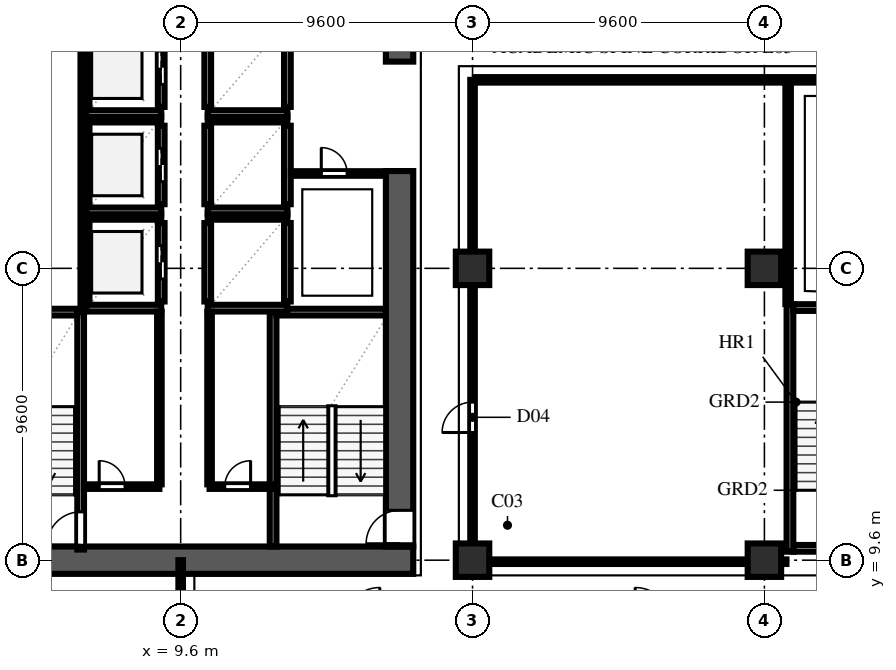
"""IFC4 building model, lengths in metres.
Left out: names, types, materials, properties, quantities, classifications, styles, units other than length and angle.
Written with IfcOpenShell. Run it as: python <this file> out.ifc"""

import sys

from ifc_helpers import new_model, si_unit, direction, frame, frame_2d, origin, origin_2d, place, context, subcontext, project, spatial, rectangle, extrude, element, fill, save


model = new_model("IFC4")
c1 = context("Model", 3, precision=1e-05, world=origin(), true_north=direction((0.0, 1.0)))
c2 = subcontext(c1, "Body", "Model", "MODEL_VIEW")
j1 = project(units=[si_unit("LENGTHUNIT", "METRE"), si_unit("PLANEANGLEUNIT", "RADIAN")], contexts=[c1])
p1 = place(None, origin())
s1 = spatial("IfcSite", under=j1, at=p1, CompositionType="ELEMENT")
p2 = place(p1, origin())
s2 = spatial("IfcBuilding", under=s1, at=p2, CompositionType="ELEMENT")
p3 = place(p2, frame((0.0, 0.0, 24.2)))
s3 = spatial("IfcBuildingStorey", under=s2, at=p3, CompositionType="ELEMENT", Elevation=24.2)
p4 = place(p3, frame((2.65, 9.6, 0.0), z_axis=(0.0, 0.0, 1.0), x_axis=(1.0, 0.0, 0.0)))
e1 = element("IfcWall", 1, at=p4, inside=s3, PredefinedType="SHEAR", context=c2, shape_type="SweptSolid", body=[
    extrude(rectangle(XDim=14.6, YDim=0.9, at=frame_2d((7.3, 0.0))), origin(), (0.0, 0.0, 1.0), 3.54),
])
p5 = place(p3, frame((16.8, 10.05, 0.0), z_axis=(0.0, 0.0, 1.0), x_axis=(0.0, 1.0, 0.0)))
e2 = element("IfcWall", 2, at=p5, inside=s3, PredefinedType="SHEAR", context=c2, shape_type="SweptSolid", body=[
    extrude(rectangle(XDim=12.35, YDim=0.9, at=frame_2d((6.175, 0.0))), origin(), (0.0, 0.0, 1.0), 3.54),
])
p6 = place(p5, frame((0.09, 0.0, 0.0)))
e3 = element("IfcOpeningElement", 3, at=p6, cuts=e2, PredefinedType="OPENING", context=c2, shape_type="SweptSolid", body=[
    extrude(rectangle(XDim=1.1, YDim=2.2, at=frame_2d((0.55, 1.1))), frame((0.0, 0.462, 0.0), z_axis=(0.0, -1.0, 0.0), x_axis=(1.0, 0.0, 0.0)), (0.0, 0.0, 1.0), 0.924),
])
p7 = place(p3, frame((16.8, 26.0, 0.0), z_axis=(0.0, 0.0, 1.0), x_axis=(0.0, 1.0, 0.0)))
e4 = element("IfcWall", 4, at=p7, inside=s3, PredefinedType="SHEAR", context=c2, shape_type="SweptSolid", body=[
    extrude(rectangle(XDim=7.8, YDim=0.9, at=frame_2d((3.9, 0.0))), origin(), (0.0, 0.0, 1.0), 3.54),
])
for number, where, z_axis, x_axis in (
    (5, (19.2, 9.6, 0.0), (0.0, 0.0, 1.0), (1.0, 0.0, 0.0)),
    (6, (19.2, 19.2, 0.0), (0.0, 0.0, 1.0), (1.0, 0.0, 0.0)),
    (7, (28.8, 9.6, 0.0), (0.0, 0.0, 1.0), (1.0, 0.0, 0.0)),
    (8, (28.8, 19.2, 0.0), (0.0, 0.0, 1.0), (1.0, 0.0, 0.0)),
):
    element("IfcColumn", number, at=place(p3, frame(where, z_axis=z_axis, x_axis=x_axis)), inside=s3, PredefinedType="COLUMN", context=c2, shape_type="SweptSolid", body=[
        extrude(rectangle(XDim=1.1, YDim=1.1, at=origin_2d()), origin(), (0.0, 0.0, 1.0), 3.8),
    ])
p8 = place(p3, frame((6.31, 9.95, 0.0), z_axis=(0.0, 0.0, 1.0), x_axis=(0.0, 1.0, 0.0)))
e9 = element("IfcWall", 9, at=p8, inside=s3, PredefinedType="SOLIDWALL", context=c2, shape_type="SweptSolid", body=[
    extrude(rectangle(XDim=7.81, YDim=0.22, at=frame_2d((3.905, 0.0))), origin(), (0.0, 0.0, 1.0), 3.54),
])
p9 = place(p8, frame((0.14, 0.0, 0.0)))
e10 = element("IfcOpeningElement", 10, at=p9, cuts=e9, PredefinedType="OPENING", context=c2, shape_type="SweptSolid", body=[
    extrude(rectangle(XDim=1.1, YDim=2.2, at=frame_2d((0.55, 1.1))), frame((0.0, 0.122, 0.0), z_axis=(0.0, -1.0, 0.0), x_axis=(1.0, 0.0, 0.0)), (0.0, 0.0, 1.0), 0.244),
])
p10 = place(p3, frame((2.65, 17.76, 0.0), z_axis=(0.0, 0.0, 1.0), x_axis=(1.0, 0.0, 0.0)))
e11 = element("IfcWall", 11, at=p10, inside=s3, PredefinedType="SOLIDWALL", context=c2, shape_type="SweptSolid", body=[
    extrude(rectangle(XDim=3.55, YDim=0.22, at=frame_2d((1.775, 0.0))), origin(), (0.0, 0.0, 1.0), 3.54),
])
p11 = place(p3, frame((12.64, 10.05, 0.0), z_axis=(0.0, 0.0, 1.0), x_axis=(0.0, 1.0, 0.0)))
e12 = element("IfcWall", 12, at=p11, inside=s3, PredefinedType="SOLIDWALL", context=c2, shape_type="SweptSolid", body=[
    extrude(rectangle(XDim=7.71, YDim=0.22, at=frame_2d((3.855, 0.0))), origin(), (0.0, 0.0, 1.0), 3.54),
])
p12 = place(p3, frame((12.75, 17.76, 0.0), z_axis=(0.0, 0.0, 1.0), x_axis=(1.0, 0.0, 0.0)))
e13 = element("IfcWall", 13, at=p12, inside=s3, PredefinedType="SOLIDWALL", context=c2, shape_type="SweptSolid", body=[
    extrude(rectangle(XDim=3.6, YDim=0.22, at=frame_2d((1.8, 0.0))), origin(), (0.0, 0.0, 1.0), 3.54),
])
p13 = place(p3, frame((29.75, 9.99, 0.0), z_axis=(0.0, 0.0, 1.0), x_axis=(1.0, 0.0, 0.0)))
e14 = element("IfcWall", 14, at=p13, inside=s3, PredefinedType="SOLIDWALL", context=c2, shape_type="SweptSolid", body=[
    extrude(rectangle(XDim=3.65, YDim=0.22, at=frame_2d((1.825, 0.0))), origin(), (0.0, 0.0, 1.0), 3.54),
])
p14 = place(p13, frame((1.24, 0.0, 0.0)))
e15 = element("IfcOpeningElement", 15, at=p14, cuts=e14, PredefinedType="OPENING", context=c2, shape_type="SweptSolid", body=[
    extrude(rectangle(XDim=1.1, YDim=2.2, at=frame_2d((0.55, 1.1))), frame((0.0, 0.122, 0.0), z_axis=(0.0, -1.0, 0.0), x_axis=(1.0, 0.0, 0.0)), (0.0, 0.0, 1.0), 0.244),
])
p15 = place(p3, frame((29.64, 9.88, 0.0), z_axis=(0.0, 0.0, 1.0), x_axis=(0.0, 1.0, 0.0)))
e16 = element("IfcWall", 16, at=p15, inside=s3, PredefinedType="SOLIDWALL", context=c2, shape_type="SweptSolid", body=[
    extrude(rectangle(XDim=8.14, YDim=0.22, at=frame_2d((4.07, 0.0))), origin(), (0.0, 0.0, 1.0), 3.54),
])
p16 = place(p3, frame((29.75, 17.91, 0.0), z_axis=(0.0, 0.0, 1.0), x_axis=(1.0, 0.0, 0.0)))
e17 = element("IfcWall", 17, at=p16, inside=s3, PredefinedType="SOLIDWALL", context=c2, shape_type="SweptSolid", body=[
    extrude(rectangle(XDim=3.65, YDim=0.22, at=frame_2d((1.825, 0.0))), origin(), (0.0, 0.0, 1.0), 3.54),
])
p17 = place(p3, frame((6.49, 18.11, 0.0), z_axis=(0.0, 0.0, 1.0), x_axis=(0.0, 1.0, 0.0)))
e18 = element("IfcWall", 18, at=p17, inside=s3, PredefinedType="SOLIDWALL", context=c2, shape_type="SweptSolid", body=[
    extrude(rectangle(XDim=2.58, YDim=0.22, at=frame_2d((1.29, 0.0))), origin(), (0.0, 0.0, 1.0), 3.54),
])
p18 = place(p3, frame((8.96, 18.11, 0.0), z_axis=(0.0, 0.0, 1.0), x_axis=(0.0, 1.0, 0.0)))
e19 = element("IfcWall", 19, at=p18, inside=s3, PredefinedType="SOLIDWALL", context=c2, shape_type="SweptSolid", body=[
    extrude(rectangle(XDim=2.58, YDim=0.22, at=frame_2d((1.29, 0.0))), origin(), (0.0, 0.0, 1.0), 3.54),
])
p19 = place(p18, frame((0.74, 0.0, 0.0)))
e20 = element("IfcOpeningElement", 20, at=p19, cuts=e19, PredefinedType="OPENING", context=c2, shape_type="SweptSolid", body=[
    extrude(rectangle(XDim=1.1, YDim=2.2, at=frame_2d((0.55, 1.1))), frame((0.0, 0.122, 0.0), z_axis=(0.0, -1.0, 0.0), x_axis=(1.0, 0.0, 0.0)), (0.0, 0.0, 1.0), 0.244),
])
for number, where, z_axis, x_axis in (
    (21, (6.49, 17.89, 0.0), (0.0, 0.0, 1.0), (1.0, 0.0, 0.0)),
    (22, (6.49, 20.91, 0.0), (0.0, 0.0, 1.0), (1.0, 0.0, 0.0)),
):
    element("IfcWall", number, at=place(p3, frame(where, z_axis=z_axis, x_axis=x_axis)), inside=s3, PredefinedType="SOLIDWALL", context=c2, shape_type="SweptSolid", body=[
        extrude(rectangle(XDim=2.47, YDim=0.22, at=frame_2d((1.235, 0.0))), origin(), (0.0, 0.0, 1.0), 3.54),
    ])
p20 = place(p3, frame((6.49, 21.31, 0.0), z_axis=(0.0, 0.0, 1.0), x_axis=(0.0, 1.0, 0.0)))
e23 = element("IfcWall", 23, at=p20, inside=s3, PredefinedType="SOLIDWALL", context=c2, shape_type="SweptSolid", body=[
    extrude(rectangle(XDim=2.58, YDim=0.22, at=frame_2d((1.29, 0.0))), origin(), (0.0, 0.0, 1.0), 3.54),
])
p21 = place(p3, frame((8.96, 21.31, 0.0), z_axis=(0.0, 0.0, 1.0), x_axis=(0.0, 1.0, 0.0)))
e24 = element("IfcWall", 24, at=p21, inside=s3, PredefinedType="SOLIDWALL", context=c2, shape_type="SweptSolid", body=[
    extrude(rectangle(XDim=2.58, YDim=0.22, at=frame_2d((1.29, 0.0))), origin(), (0.0, 0.0, 1.0), 3.54),
])
p22 = place(p21, frame((0.74, 0.0, 0.0)))
e25 = element("IfcOpeningElement", 25, at=p22, cuts=e24, PredefinedType="OPENING", context=c2, shape_type="SweptSolid", body=[
    extrude(rectangle(XDim=1.1, YDim=2.2, at=frame_2d((0.55, 1.1))), frame((0.0, 0.122, 0.0), z_axis=(0.0, -1.0, 0.0), x_axis=(1.0, 0.0, 0.0)), (0.0, 0.0, 1.0), 0.244),
])
for number, where, z_axis, x_axis in (
    (26, (6.49, 21.09, 0.0), (0.0, 0.0, 1.0), (1.0, 0.0, 0.0)),
    (27, (6.49, 24.11, 0.0), (0.0, 0.0, 1.0), (1.0, 0.0, 0.0)),
):
    element("IfcWall", number, at=place(p3, frame(where, z_axis=z_axis, x_axis=x_axis)), inside=s3, PredefinedType="SOLIDWALL", context=c2, shape_type="SweptSolid", body=[
        extrude(rectangle(XDim=2.47, YDim=0.22, at=frame_2d((1.235, 0.0))), origin(), (0.0, 0.0, 1.0), 3.54),
    ])
p23 = place(p3, frame((6.49, 24.51, 0.0), z_axis=(0.0, 0.0, 1.0), x_axis=(0.0, 1.0, 0.0)))
e28 = element("IfcWall", 28, at=p23, inside=s3, PredefinedType="SOLIDWALL", context=c2, shape_type="SweptSolid", body=[
    extrude(rectangle(XDim=2.58, YDim=0.22, at=frame_2d((1.29, 0.0))), origin(), (0.0, 0.0, 1.0), 3.54),
])
p24 = place(p3, frame((8.96, 24.51, 0.0), z_axis=(0.0, 0.0, 1.0), x_axis=(0.0, 1.0, 0.0)))
e29 = element("IfcWall", 29, at=p24, inside=s3, PredefinedType="SOLIDWALL", context=c2, shape_type="SweptSolid", body=[
    extrude(rectangle(XDim=2.58, YDim=0.22, at=frame_2d((1.29, 0.0))), origin(), (0.0, 0.0, 1.0), 3.54),
])
p25 = place(p24, frame((0.74, 0.0, 0.0)))
e30 = element("IfcOpeningElement", 30, at=p25, cuts=e29, PredefinedType="OPENING", context=c2, shape_type="SweptSolid", body=[
    extrude(rectangle(XDim=1.1, YDim=2.2, at=frame_2d((0.55, 1.1))), frame((0.0, 0.122, 0.0), z_axis=(0.0, -1.0, 0.0), x_axis=(1.0, 0.0, 0.0)), (0.0, 0.0, 1.0), 0.244),
])
p26 = place(p3, frame((6.49, 24.29, 0.0), z_axis=(0.0, 0.0, 1.0), x_axis=(1.0, 0.0, 0.0)))
e31 = element("IfcWall", 31, at=p26, inside=s3, PredefinedType="SOLIDWALL", context=c2, shape_type="SweptSolid", body=[
    extrude(rectangle(XDim=2.47, YDim=0.22, at=frame_2d((1.235, 0.0))), origin(), (0.0, 0.0, 1.0), 3.54),
])
for number, where, z_axis, x_axis in (
    (32, (10.49, 18.11, 0.0), (0.0, 0.0, 1.0), (0.0, 1.0, 0.0)),
    (33, (13.11, 18.11, 0.0), (0.0, 0.0, 1.0), (0.0, 1.0, 0.0)),
):
    element("IfcWall", number, at=place(p3, frame(where, z_axis=z_axis, x_axis=x_axis)), inside=s3, PredefinedType="SOLIDWALL", context=c2, shape_type="SweptSolid", body=[
        extrude(rectangle(XDim=2.58, YDim=0.22, at=frame_2d((1.29, 0.0))), origin(), (0.0, 0.0, 1.0), 3.54),
    ])
for number, where, z_axis, x_axis in (
    (34, (10.49, 17.89, 0.0), (0.0, 0.0, 1.0), (1.0, 0.0, 0.0)),
    (35, (10.49, 20.91, 0.0), (0.0, 0.0, 1.0), (1.0, 0.0, 0.0)),
):
    element("IfcWall", number, at=place(p3, frame(where, z_axis=z_axis, x_axis=x_axis)), inside=s3, PredefinedType="SOLIDWALL", context=c2, shape_type="SweptSolid", body=[
        extrude(rectangle(XDim=2.62, YDim=0.22, at=frame_2d((1.31, 0.0))), origin(), (0.0, 0.0, 1.0), 3.54),
    ])
for number, where, z_axis, x_axis in (
    (36, (10.49, 21.31, 0.0), (0.0, 0.0, 1.0), (0.0, 1.0, 0.0)),
    (37, (13.11, 21.31, 0.0), (0.0, 0.0, 1.0), (0.0, 1.0, 0.0)),
):
    element("IfcWall", number, at=place(p3, frame(where, z_axis=z_axis, x_axis=x_axis)), inside=s3, PredefinedType="SOLIDWALL", context=c2, shape_type="SweptSolid", body=[
        extrude(rectangle(XDim=2.58, YDim=0.22, at=frame_2d((1.29, 0.0))), origin(), (0.0, 0.0, 1.0), 3.54),
    ])
for number, where, z_axis, x_axis in (
    (38, (10.49, 21.09, 0.0), (0.0, 0.0, 1.0), (1.0, 0.0, 0.0)),
    (39, (10.49, 24.11, 0.0), (0.0, 0.0, 1.0), (1.0, 0.0, 0.0)),
):
    element("IfcWall", number, at=place(p3, frame(where, z_axis=z_axis, x_axis=x_axis)), inside=s3, PredefinedType="SOLIDWALL", context=c2, shape_type="SweptSolid", body=[
        extrude(rectangle(XDim=2.62, YDim=0.22, at=frame_2d((1.31, 0.0))), origin(), (0.0, 0.0, 1.0), 3.54),
    ])
for number, where, z_axis, x_axis in (
    (40, (10.49, 24.51, 0.0), (0.0, 0.0, 1.0), (0.0, 1.0, 0.0)),
    (41, (13.11, 24.51, 0.0), (0.0, 0.0, 1.0), (0.0, 1.0, 0.0)),
):
    element("IfcWall", number, at=place(p3, frame(where, z_axis=z_axis, x_axis=x_axis)), inside=s3, PredefinedType="SOLIDWALL", context=c2, shape_type="SweptSolid", body=[
        extrude(rectangle(XDim=2.58, YDim=0.22, at=frame_2d((1.29, 0.0))), origin(), (0.0, 0.0, 1.0), 3.54),
    ])
p27 = place(p3, frame((10.49, 24.29, 0.0), z_axis=(0.0, 0.0, 1.0), x_axis=(1.0, 0.0, 0.0)))
e42 = element("IfcWall", 42, at=p27, inside=s3, PredefinedType="SOLIDWALL", context=c2, shape_type="SweptSolid", body=[
    extrude(rectangle(XDim=2.62, YDim=0.22, at=frame_2d((1.31, 0.0))), origin(), (0.0, 0.0, 1.0), 3.54),
])
p28 = place(p3, frame((6.42, 12.02, 0.0), z_axis=(0.0, 0.0, 1.0), x_axis=(1.0, 0.0, 0.0)))
e43 = element("IfcWall", 43, at=p28, inside=s3, PredefinedType="PARTITIONING", context=c2, shape_type="SweptSolid", body=[
    extrude(rectangle(XDim=2.48, YDim=0.15, at=frame_2d((1.24, 0.0))), origin(), (0.0, 0.0, 1.0), 3.54),
])
p29 = place(p28, frame((0.5, 0.0, 0.0)))
e44 = element("IfcOpeningElement", 44, at=p29, cuts=e43, PredefinedType="OPENING", context=c2, shape_type="SweptSolid", body=[
    extrude(rectangle(XDim=0.85, YDim=2.1, at=frame_2d((0.425, 1.05))), frame((0.0, 0.087, 0.0), z_axis=(0.0, -1.0, 0.0), x_axis=(1.0, 0.0, 0.0)), (0.0, 0.0, 1.0), 0.174),
])
p30 = place(p3, frame((10.55, 12.02, 0.0), z_axis=(0.0, 0.0, 1.0), x_axis=(1.0, 0.0, 0.0)))
e45 = element("IfcWall", 45, at=p30, inside=s3, PredefinedType="PARTITIONING", context=c2, shape_type="SweptSolid", body=[
    extrude(rectangle(XDim=2.08, YDim=0.15, at=frame_2d((1.04, 0.0))), origin(), (0.0, 0.0, 1.0), 3.54),
])
p31 = place(p30, frame((0.5, 0.0, 0.0)))
e46 = element("IfcOpeningElement", 46, at=p31, cuts=e45, PredefinedType="OPENING", context=c2, shape_type="SweptSolid", body=[
    extrude(rectangle(XDim=0.85, YDim=2.1, at=frame_2d((0.425, 1.05))), frame((0.0, 0.087, 0.0), z_axis=(0.0, -1.0, 0.0), x_axis=(1.0, 0.0, 0.0)), (0.0, 0.0, 1.0), 0.174),
])
for number, where, z_axis, x_axis in (
    (47, (8.9, 12.095, 0.0), (0.0, 0.0, 1.0), (0.0, 1.0, 0.0)),
    (48, (10.55, 12.095, 0.0), (0.0, 0.0, 1.0), (0.0, 1.0, 0.0)),
):
    element("IfcWall", number, at=place(p3, frame(where, z_axis=z_axis, x_axis=x_axis)), inside=s3, PredefinedType="PARTITIONING", context=c2, shape_type="SweptSolid", body=[
        extrude(rectangle(XDim=5.68, YDim=0.15, at=frame_2d((2.84, 0.0))), origin(), (0.0, 0.0, 1.0), 3.54),
    ])
p32 = place(p3, frame((13.225, 22.32, 0.0), z_axis=(0.0, 0.0, 1.0), x_axis=(1.0, 0.0, 0.0)))
e49 = element("IfcWall", 49, at=p32, inside=s3, PredefinedType="PARTITIONING", context=c2, shape_type="SweptSolid", body=[
    extrude(rectangle(XDim=3.12, YDim=0.15, at=frame_2d((1.56, 0.0))), origin(), (0.0, 0.0, 1.0), 3.54),
])
p33 = place(p32, frame((1.0, 0.0, 0.0)))
e50 = element("IfcOpeningElement", 50, at=p33, cuts=e49, PredefinedType="OPENING", context=c2, shape_type="SweptSolid", body=[
    extrude(rectangle(XDim=0.85, YDim=2.1, at=frame_2d((0.425, 1.05))), frame((0.0, 0.087, 0.0), z_axis=(0.0, -1.0, 0.0), x_axis=(1.0, 0.0, 0.0)), (0.0, 0.0, 1.0), 0.174),
])
p34 = place(p3, frame((6.38, 17.8, 0.0), z_axis=(0.0, 0.0, 1.0), x_axis=(0.0, 1.0, 0.0)))
e51 = element("IfcWall", 51, at=p34, inside=s3, PredefinedType="PARTITIONING", context=c2, shape_type="SweptSolid", body=[
    extrude(rectangle(XDim=18.98, YDim=0.15, at=frame_2d((9.49, 0.0))), origin(), (0.0, 0.0, 1.0), 3.54),
])
p35 = place(p34, frame((14.3, 0.0, 0.0)))
e52 = element("IfcOpeningElement", 52, at=p35, cuts=e51, PredefinedType="OPENING", context=c2, shape_type="SweptSolid", body=[
    extrude(rectangle(XDim=0.85, YDim=2.1, at=frame_2d((0.425, 1.05))), frame((0.0, 0.087, 0.0), z_axis=(0.0, -1.0, 0.0), x_axis=(1.0, 0.0, 0.0)), (0.0, 0.0, 1.0), 0.174),
])
p36 = place(p3, frame((9.6, 7.5, 0.0), z_axis=(0.0, 0.0, 1.0), x_axis=(0.0, 1.0, 0.0)))
e53 = element("IfcWall", 53, at=p36, inside=s3, PredefinedType="PARTITIONING", context=c2, shape_type="SweptSolid", body=[
    extrude(rectangle(XDim=2.1, YDim=0.15, at=frame_2d((1.05, 0.0))), origin(), (0.0, 0.0, 1.0), 2.923),
])
p37 = place(p3, frame((19.2, 9.55, 0.0), z_axis=(0.0, 0.0, 1.0), x_axis=(0.0, 1.0, 0.0)))
e54 = element("IfcWall", 54, at=p37, inside=s3, PredefinedType="PARTITIONING", context=c2, shape_type="SweptSolid", body=[
    extrude(rectangle(XDim=15.85, YDim=0.15, at=frame_2d((7.925, 0.0))), origin(), (0.0, 0.0, 1.0), 2.923),
])
p38 = place(p37, frame((4.25, 0.0, 0.0)))
e55 = element("IfcOpeningElement", 55, at=p38, cuts=e54, PredefinedType="OPENING", context=c2, shape_type="SweptSolid", body=[
    extrude(rectangle(XDim=1.0, YDim=2.2, at=frame_2d((0.5, 1.1))), frame((0.0, 0.087, 0.0), z_axis=(0.0, -1.0, 0.0), x_axis=(1.0, 0.0, 0.0)), (0.0, 0.0, 1.0), 0.174),
])
p39 = place(p3, frame((29.58, 18.025, 0.0), z_axis=(0.0, 0.0, 1.0), x_axis=(0.0, 1.0, 0.0)))
e56 = element("IfcWall", 56, at=p39, inside=s3, PredefinedType="PARTITIONING", context=c2, shape_type="SweptSolid", body=[
    extrude(rectangle(XDim=7.28, YDim=0.18, at=frame_2d((3.64, 0.0))), origin(), (0.0, 0.0, 1.0), 3.54),
])
p40 = place(p3, frame((19.28, 25.4, 0.0), z_axis=(0.0, 0.0, 1.0), x_axis=(1.0, 0.0, 0.0)))
e57 = element("IfcWall", 57, at=p40, inside=s3, PredefinedType="PARTITIONING", context=c2, shape_type="SweptSolid", body=[
    extrude(rectangle(XDim=35.695, YDim=0.18, at=frame_2d((17.848, 0.0))), origin(), (0.0, 0.0, 1.0), 3.54),
])
p41 = place(p40, frame((22.457, 0.0, 0.0)))
e58 = element("IfcOpeningElement", 58, at=p41, cuts=e57, PredefinedType="OPENING", context=c2, shape_type="SweptSolid", body=[
    extrude(rectangle(XDim=1.2, YDim=2.2, at=frame_2d((0.6, 1.1))), frame((0.0, 0.102, 0.0), z_axis=(0.0, -1.0, 0.0), x_axis=(1.0, 0.0, 0.0)), (0.0, 0.0, 1.0), 0.204),
])
p42 = place(p3, frame((19.28, 9.55, 0.0), z_axis=(0.0, 0.0, 1.0), x_axis=(1.0, 0.0, 0.0)))
e59 = element("IfcWall", 59, at=p42, inside=s3, PredefinedType="PARTITIONING", context=c2, shape_type="SweptSolid", body=[
    extrude(rectangle(XDim=10.245, YDim=0.15, at=frame_2d((5.123, 0.0))), origin(), (0.0, 0.0, 1.0), 2.923),
])
p43 = place(p9, origin())
e60 = element("IfcDoor", 60, at=p43, inside=s3, OperationType="SINGLE_SWING_LEFT", PredefinedType="DOOR", context=c2, shape_type="SweptSolid", body=[
    extrude(rectangle(XDim=1.1, YDim=2.2, at=frame_2d((0.55, 1.1))), frame((0.0, 0.025, 0.0), z_axis=(0.0, -1.0, 0.0), x_axis=(1.0, 0.0, 0.0)), (0.0, 0.0, 1.0), 0.05),
])
fill(e10, e60)
p44 = place(p6, origin())
e61 = element("IfcDoor", 61, at=p44, inside=s3, OperationType="SINGLE_SWING_LEFT", PredefinedType="DOOR", context=c2, shape_type="SweptSolid", body=[
    extrude(rectangle(XDim=1.1, YDim=2.2, at=frame_2d((0.55, 1.1))), frame((0.0, 0.025, 0.0), z_axis=(0.0, -1.0, 0.0), x_axis=(1.0, 0.0, 0.0)), (0.0, 0.0, 1.0), 0.05),
])
fill(e3, e61)
p45 = place(p19, origin())
e62 = element("IfcDoor", 62, at=p45, inside=s3, OperationType="DOUBLE_DOOR_SLIDING", PredefinedType="DOOR", context=c2, shape_type="SweptSolid", body=[
    extrude(rectangle(XDim=1.1, YDim=2.2, at=frame_2d((0.55, 1.1))), frame((0.0, 0.025, 0.0), z_axis=(0.0, -1.0, 0.0), x_axis=(1.0, 0.0, 0.0)), (0.0, 0.0, 1.0), 0.05),
])
fill(e20, e62)
p46 = place(p22, origin())
e63 = element("IfcDoor", 63, at=p46, inside=s3, OperationType="DOUBLE_DOOR_SLIDING", PredefinedType="DOOR", context=c2, shape_type="SweptSolid", body=[
    extrude(rectangle(XDim=1.1, YDim=2.2, at=frame_2d((0.55, 1.1))), frame((0.0, 0.025, 0.0), z_axis=(0.0, -1.0, 0.0), x_axis=(1.0, 0.0, 0.0)), (0.0, 0.0, 1.0), 0.05),
])
fill(e25, e63)
p47 = place(p25, origin())
e64 = element("IfcDoor", 64, at=p47, inside=s3, OperationType="DOUBLE_DOOR_SLIDING", PredefinedType="DOOR", context=c2, shape_type="SweptSolid", body=[
    extrude(rectangle(XDim=1.1, YDim=2.2, at=frame_2d((0.55, 1.1))), frame((0.0, 0.025, 0.0), z_axis=(0.0, -1.0, 0.0), x_axis=(1.0, 0.0, 0.0)), (0.0, 0.0, 1.0), 0.05),
])
fill(e30, e64)
p48 = place(p29, origin())
e65 = element("IfcDoor", 65, at=p48, inside=s3, OperationType="SINGLE_SWING_LEFT", PredefinedType="DOOR", context=c2, shape_type="SweptSolid", body=[
    extrude(rectangle(XDim=0.85, YDim=2.1, at=frame_2d((0.425, 1.05))), frame((0.0, 0.025, 0.0), z_axis=(0.0, -1.0, 0.0), x_axis=(1.0, 0.0, 0.0)), (0.0, 0.0, 1.0), 0.05),
])
fill(e44, e65)
p49 = place(p31, origin())
e66 = element("IfcDoor", 66, at=p49, inside=s3, OperationType="SINGLE_SWING_RIGHT", PredefinedType="DOOR", context=c2, shape_type="SweptSolid", body=[
    extrude(rectangle(XDim=0.85, YDim=2.1, at=frame_2d((0.425, 1.05))), frame((0.0, 0.025, 0.0), z_axis=(0.0, -1.0, 0.0), x_axis=(1.0, 0.0, 0.0)), (0.0, 0.0, 1.0), 0.05),
])
fill(e46, e66)
p50 = place(p33, origin())
e67 = element("IfcDoor", 67, at=p50, inside=s3, OperationType="SINGLE_SWING_LEFT", PredefinedType="DOOR", context=c2, shape_type="SweptSolid", body=[
    extrude(rectangle(XDim=0.85, YDim=2.1, at=frame_2d((0.425, 1.05))), frame((0.0, 0.025, 0.0), z_axis=(0.0, -1.0, 0.0), x_axis=(1.0, 0.0, 0.0)), (0.0, 0.0, 1.0), 0.05),
])
fill(e50, e67)
p51 = place(p38, origin())
e68 = element("IfcDoor", 68, at=p51, inside=s3, OperationType="SINGLE_SWING_LEFT", PredefinedType="DOOR", context=c2, shape_type="SweptSolid", body=[
    extrude(rectangle(XDim=1.0, YDim=2.2, at=frame_2d((0.5, 1.1))), frame((0.0, 0.025, 0.0), z_axis=(0.0, -1.0, 0.0), x_axis=(1.0, 0.0, 0.0)), (0.0, 0.0, 1.0), 0.05),
])
fill(e55, e68)
save(model, sys.argv[1])
